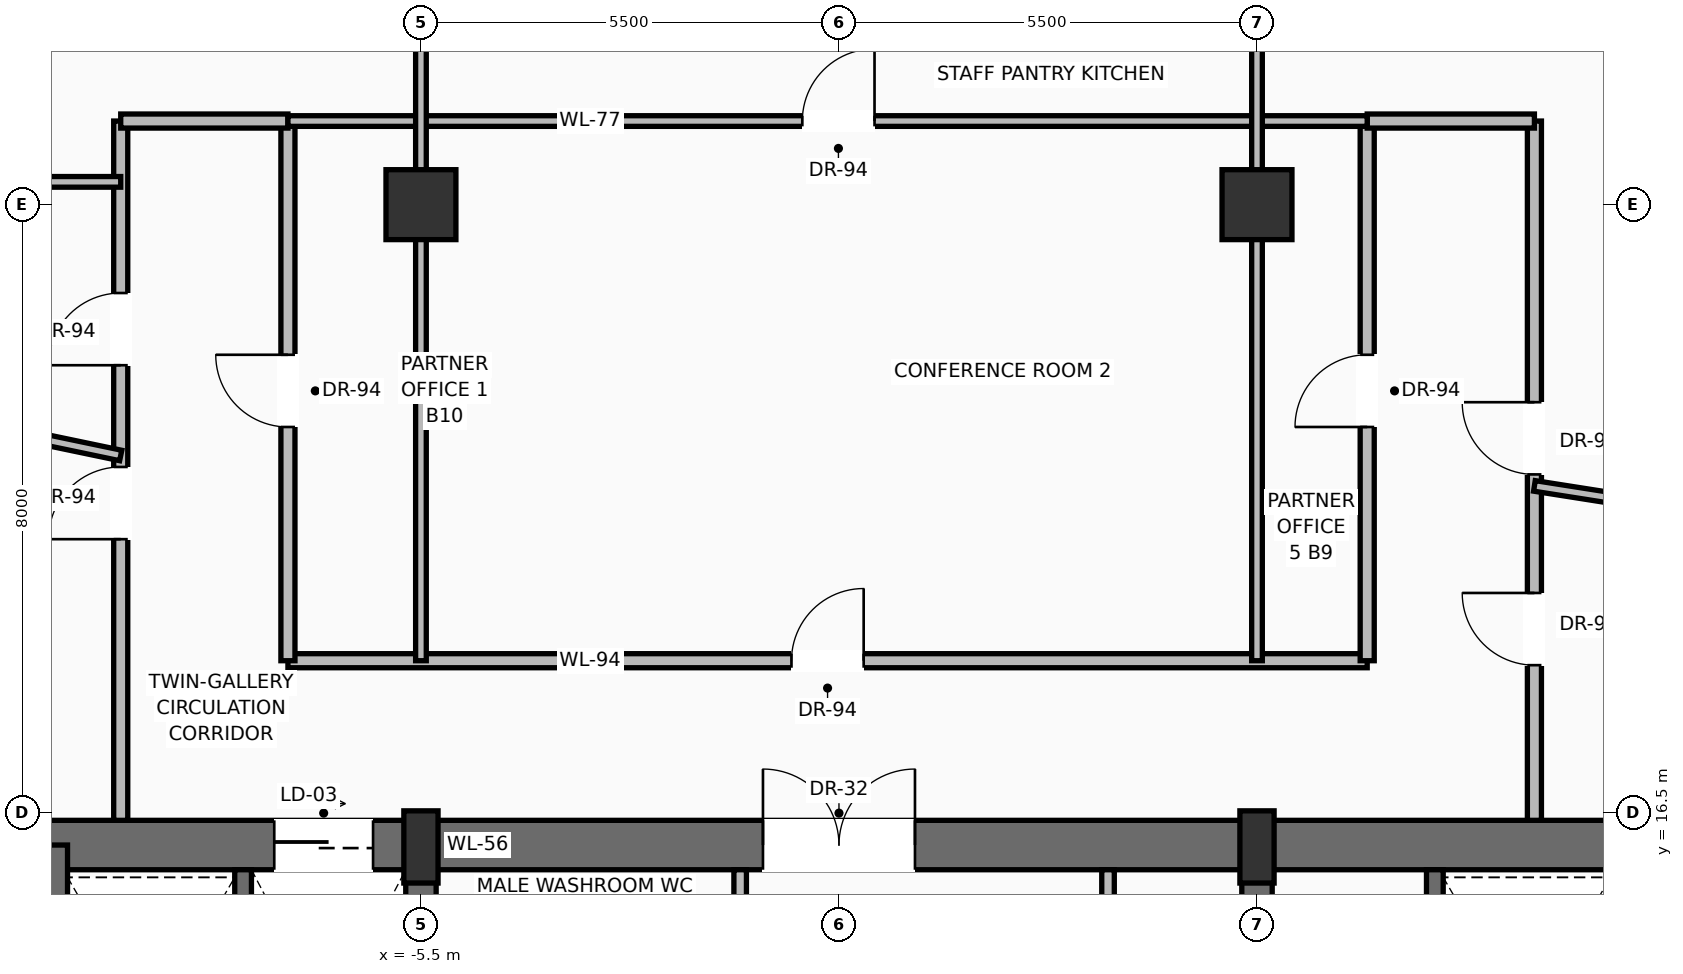
"""IFC4 building model, lengths in metres.
Left out: names, types, materials, properties, quantities, classifications, styles, units other than length and angle.
Written with IfcOpenShell. Run it as: python <this file> out.ifc"""

import sys

from ifc_helpers import new_model, si_unit, direction, frame, frame_2d, origin, origin_2d, place, context, subcontext, project, spatial, rectangle, extrude, source, transform, mapped, element, fill, save


model = new_model("IFC4")
c1 = context("Model", 3, precision=1e-05, world=origin(), true_north=direction((0.0, 1.0)))
c2 = subcontext(c1, "Body", "Model", "MODEL_VIEW")
j1 = project(units=[si_unit("LENGTHUNIT", "METRE"), si_unit("PLANEANGLEUNIT", "RADIAN")], contexts=[c1])
p1 = place(None, origin())
s1 = spatial("IfcSite", under=j1, at=p1, CompositionType="ELEMENT")
p2 = place(p1, origin())
s2 = spatial("IfcBuilding", under=s1, at=p2, CompositionType="ELEMENT")
p3 = place(p2, frame((0.0, 0.0, 174.7)))
s3 = spatial("IfcBuildingStorey", under=s2, at=p3, CompositionType="ELEMENT", Elevation=174.7)
p4 = place(p3, frame((-10.8, 16.075, 0.0), z_axis=(0.0, 0.0, 1.0), x_axis=(1.0, 0.0, 0.0)))
e1 = element("IfcWall", 1, at=p4, inside=s3, PredefinedType="SHEAR", context=c2, shape_type="SweptSolid", body=[
    extrude(rectangle(XDim=21.6, YDim=0.65, at=frame_2d((10.8, 0.0))), origin(), (0.0, 0.0, 1.0), 3.47),
])
p5 = place(p4, frame((3.37, 0.0, 0.0)))
e2 = element("IfcOpeningElement", 2, at=p5, cuts=e1, PredefinedType="OPENING", context=c2, shape_type="SweptSolid", body=[
    extrude(rectangle(XDim=1.3, YDim=2.3, at=frame_2d((0.65, 1.15))), frame((0.0, 0.335, 0.0), z_axis=(0.0, -1.0, 0.0), x_axis=(1.0, 0.0, 0.0)), (0.0, 0.0, 1.0), 0.67),
])
p6 = place(p4, frame((9.8, 0.0, 0.0)))
e3 = element("IfcOpeningElement", 3, at=p6, cuts=e1, PredefinedType="OPENING", context=c2, shape_type="SweptSolid", body=[
    extrude(rectangle(XDim=2.0, YDim=2.4, at=frame_2d((1.0, 1.2))), frame((0.0, 0.335, 0.0), z_axis=(0.0, -1.0, 0.0), x_axis=(1.0, 0.0, 0.0)), (0.0, 0.0, 1.0), 0.67),
])
p7 = place(p3, frame((-10.475, 0.525, 0.0), z_axis=(0.0, 0.0, 1.0), x_axis=(0.0, 1.0, 0.0)))
e4 = element("IfcWall", 4, at=p7, inside=s3, PredefinedType="SHEAR", context=c2, shape_type="SweptSolid", body=[
    extrude(rectangle(XDim=15.55, YDim=0.65, at=frame_2d((7.775, 0.0))), origin(), (0.0, 0.0, 1.0), 3.47),
])
p8 = place(p3, frame((-5.5, 0.525, 0.0), z_axis=(0.0, 0.0, 1.0), x_axis=(0.0, 1.0, 0.0)))
e5 = element("IfcWall", 5, at=p8, inside=s3, PredefinedType="SHEAR", context=c2, shape_type="SweptSolid", body=[
    extrude(rectangle(XDim=15.55, YDim=0.4, at=frame_2d((7.775, 0.0))), origin(), (0.0, 0.0, 1.0), 3.47),
])
p9 = place(p8, frame((8.975, 0.0, 0.0)))
e6 = element("IfcOpeningElement", 6, at=p9, cuts=e5, PredefinedType="OPENING", context=c2, shape_type="SweptSolid", body=[
    extrude(rectangle(XDim=1.1, YDim=2.2, at=frame_2d((0.55, 1.1))), frame((0.0, 0.21, 0.0), z_axis=(0.0, -1.0, 0.0), x_axis=(1.0, 0.0, 0.0)), (0.0, 0.0, 1.0), 0.42),
])
p10 = place(p3, frame((5.5, 0.525, 0.0), z_axis=(0.0, 0.0, 1.0), x_axis=(0.0, 1.0, 0.0)))
e7 = element("IfcWall", 7, at=p10, inside=s3, PredefinedType="SHEAR", context=c2, shape_type="SweptSolid", body=[
    extrude(rectangle(XDim=15.55, YDim=0.4, at=frame_2d((7.775, 0.0))), origin(), (0.0, 0.0, 1.0), 3.47),
])
p11 = place(p10, frame((8.975, 0.0, 0.0)))
e8 = element("IfcOpeningElement", 8, at=p11, cuts=e7, PredefinedType="OPENING", context=c2, shape_type="SweptSolid", body=[
    extrude(rectangle(XDim=1.1, YDim=2.2, at=frame_2d((0.55, 1.1))), frame((0.0, 0.21, 0.0), z_axis=(0.0, -1.0, 0.0), x_axis=(1.0, 0.0, 0.0)), (0.0, 0.0, 1.0), 0.42),
])
m1 = source(origin(), c2, "Body", "SweptSolid", [
    extrude(rectangle(XDim=0.45, YDim=0.95, at=origin_2d()), origin(), (0.0, 0.0, 1.0), 3.7),
])
for number, where, z_axis, x_axis in (
    (9, (-5.5, 16.05, 0.0), (0.0, 0.0, 1.0), (1.0, 0.0, 0.0)),
    (10, (5.5, 16.05, 0.0), (0.0, 0.0, 1.0), (1.0, 0.0, 0.0)),
):
    element("IfcColumn", number, at=place(p3, frame(where, z_axis=z_axis, x_axis=x_axis)), inside=s3, PredefinedType="PILASTER", context=c2, shape_type="MappedRepresentation", body=[
        mapped(m1, transform((0.0, 0.0, 0.0), scale=1.0)),
    ])
m2 = source(origin(), c2, "Body", "SweptSolid", [
    extrude(rectangle(XDim=0.92, YDim=0.92, at=origin_2d()), origin(), (0.0, 0.0, 1.0), 3.7),
])
for number, where, z_axis, x_axis in (
    (11, (-5.5, 24.5, 0.0), (0.0, 0.0, 1.0), (1.0, 0.0, 0.0)),
    (12, (5.5, 24.5, 0.0), (0.0, 0.0, 1.0), (1.0, 0.0, 0.0)),
):
    element("IfcColumn", number, at=place(p3, frame(where, z_axis=z_axis, x_axis=x_axis)), inside=s3, PredefinedType="COLUMN", context=c2, shape_type="MappedRepresentation", body=[
        mapped(m2, transform((0.0, 0.0, 0.0), scale=1.0)),
    ])
for number, where, z_axis, x_axis in (
    (13, (-7.84, 11.87, 0.0), (0.0, 0.0, 1.0), (0.0, 1.0, 0.0)),
    (14, (7.84, 11.87, 0.0), (0.0, 0.0, 1.0), (0.0, 1.0, 0.0)),
):
    element("IfcWall", number, at=place(p3, frame(where, z_axis=z_axis, x_axis=x_axis)), inside=s3, PredefinedType="SOLIDWALL", context=c2, shape_type="SweptSolid", body=[
        extrude(rectangle(XDim=3.88, YDim=0.22, at=frame_2d((1.94, 0.0))), origin(), (0.0, 0.0, 1.0), 3.47),
    ])
p12 = place(p3, frame((-1.3, 13.6, 0.0), z_axis=(0.0, 0.0, 1.0), x_axis=(0.0, 1.0, 0.0)))
e15 = element("IfcWall", 15, at=p12, inside=s3, PredefinedType="PARTITIONING", context=c2, shape_type="SweptSolid", body=[
    extrude(rectangle(XDim=2.15, YDim=0.165, at=frame_2d((1.075, 0.0))), origin(), (0.0, 0.0, 1.0), 3.462),
])
p13 = place(p12, frame((0.55, 0.0, 0.0)))
e16 = element("IfcOpeningElement", 16, at=p13, cuts=e15, PredefinedType="OPENING", context=c2, shape_type="SweptSolid", body=[
    extrude(rectangle(XDim=0.9, YDim=2.1, at=frame_2d((0.45, 1.05))), frame((0.0, 0.093, 0.0), z_axis=(0.0, -1.0, 0.0), x_axis=(1.0, 0.0, 0.0)), (0.0, 0.0, 1.0), 0.185),
])
p14 = place(p3, frame((3.54, 11.22, 0.0), z_axis=(0.0, 0.0, 1.0), x_axis=(0.0, 1.0, 0.0)))
e17 = element("IfcWall", 17, at=p14, inside=s3, PredefinedType="PARTITIONING", context=c2, shape_type="SweptSolid", body=[
    extrude(rectangle(XDim=4.53, YDim=0.165, at=frame_2d((2.265, 0.0))), origin(), (0.0, 0.0, 1.0), 3.462),
])
p15 = place(p14, frame((1.25, 0.0, 0.0)))
e18 = element("IfcOpeningElement", 18, at=p15, cuts=e17, PredefinedType="OPENING", context=c2, shape_type="SweptSolid", body=[
    extrude(rectangle(XDim=0.9, YDim=2.1, at=frame_2d((0.45, 1.05))), frame((0.0, 0.093, 0.0), z_axis=(0.0, -1.0, 0.0), x_axis=(1.0, 0.0, 0.0)), (0.0, 0.0, 1.0), 0.185),
])
p16 = place(p3, frame((-7.25, 18.5, 0.0), z_axis=(0.0, 0.0, 1.0), x_axis=(1.0, 0.0, 0.0)))
e19 = element("IfcWall", 19, at=p16, inside=s3, PredefinedType="PARTITIONING", context=c2, shape_type="SweptSolid", body=[
    extrude(rectangle(XDim=14.2, YDim=0.185, at=frame_2d((7.1, 0.0))), origin(), (0.0, 0.0, 1.0), 2.846),
])
p17 = place(p16, frame((6.625, 0.0, 0.0)))
e20 = element("IfcOpeningElement", 20, at=p17, cuts=e19, PredefinedType="OPENING", context=c2, shape_type="SweptSolid", body=[
    extrude(rectangle(XDim=0.95, YDim=2.2, at=frame_2d((0.475, 1.1))), frame((0.0, 0.103, 0.0), z_axis=(0.0, -1.0, 0.0), x_axis=(1.0, 0.0, 0.0)), (0.0, 0.0, 1.0), 0.205),
])
p18 = place(p3, frame((-7.25, 18.5, 0.0), z_axis=(0.0, 0.0, 1.0), x_axis=(0.0, 1.0, 0.0)))
e21 = element("IfcWall", 21, at=p18, inside=s3, PredefinedType="PARTITIONING", context=c2, shape_type="SweptSolid", body=[
    extrude(rectangle(XDim=7.1, YDim=0.185, at=frame_2d((3.55, 0.0))), origin(), (0.0, 0.0, 1.0), 2.846),
])
p19 = place(p18, frame((3.075, 0.0, 0.0)))
e22 = element("IfcOpeningElement", 22, at=p19, cuts=e21, PredefinedType="OPENING", context=c2, shape_type="SweptSolid", body=[
    extrude(rectangle(XDim=0.95, YDim=2.2, at=frame_2d((0.475, 1.1))), frame((0.0, 0.103, 0.0), z_axis=(0.0, -1.0, 0.0), x_axis=(1.0, 0.0, 0.0)), (0.0, 0.0, 1.0), 0.205),
])
p20 = place(p3, frame((6.95, 18.5, 0.0), z_axis=(0.0, 0.0, 1.0), x_axis=(0.0, 1.0, 0.0)))
e23 = element("IfcWall", 23, at=p20, inside=s3, PredefinedType="PARTITIONING", context=c2, shape_type="SweptSolid", body=[
    extrude(rectangle(XDim=7.1, YDim=0.185, at=frame_2d((3.55, 0.0))), origin(), (0.0, 0.0, 1.0), 2.846),
])
p21 = place(p20, frame((3.075, 0.0, 0.0)))
e24 = element("IfcOpeningElement", 24, at=p21, cuts=e23, PredefinedType="OPENING", context=c2, shape_type="SweptSolid", body=[
    extrude(rectangle(XDim=0.95, YDim=2.2, at=frame_2d((0.475, 1.1))), frame((0.0, 0.103, 0.0), z_axis=(0.0, -1.0, 0.0), x_axis=(1.0, 0.0, 0.0)), (0.0, 0.0, 1.0), 0.205),
])
p22 = place(p3, frame((-9.45, 16.4, 0.0), z_axis=(0.0, 0.0, 1.0), x_axis=(0.0, 1.0, 0.0)))
e25 = element("IfcWall", 25, at=p22, inside=s3, PredefinedType="PARTITIONING", context=c2, shape_type="SweptSolid", body=[
    extrude(rectangle(XDim=9.2, YDim=0.185, at=frame_2d((4.6, 0.0))), origin(), (0.0, 0.0, 1.0), 2.846),
])
p23 = place(p22, frame((3.699, 0.0, 0.0)))
e26 = element("IfcOpeningElement", 26, at=p23, cuts=e25, PredefinedType="OPENING", context=c2, shape_type="SweptSolid", body=[
    extrude(rectangle(XDim=0.95, YDim=2.2, at=frame_2d((0.475, 1.1))), frame((0.0, 0.103, 0.0), z_axis=(0.0, -1.0, 0.0), x_axis=(1.0, 0.0, 0.0)), (0.0, 0.0, 1.0), 0.205),
])
p24 = place(p22, frame((5.988, 0.0, 0.0)))
e27 = element("IfcOpeningElement", 27, at=p24, cuts=e25, PredefinedType="OPENING", context=c2, shape_type="SweptSolid", body=[
    extrude(rectangle(XDim=0.95, YDim=2.2, at=frame_2d((0.475, 1.1))), frame((0.0, 0.103, 0.0), z_axis=(0.0, -1.0, 0.0), x_axis=(1.0, 0.0, 0.0)), (0.0, 0.0, 1.0), 0.205),
])
p25 = place(p3, frame((9.15, 16.4, 0.0), z_axis=(0.0, 0.0, 1.0), x_axis=(0.0, 1.0, 0.0)))
e28 = element("IfcWall", 28, at=p25, inside=s3, PredefinedType="PARTITIONING", context=c2, shape_type="SweptSolid", body=[
    extrude(rectangle(XDim=9.2, YDim=0.185, at=frame_2d((4.6, 0.0))), origin(), (0.0, 0.0, 1.0), 2.846),
])
p26 = place(p25, frame((4.551, 0.0, 0.0)))
e29 = element("IfcOpeningElement", 29, at=p26, cuts=e28, PredefinedType="OPENING", context=c2, shape_type="SweptSolid", body=[
    extrude(rectangle(XDim=0.95, YDim=2.2, at=frame_2d((0.475, 1.1))), frame((0.0, 0.103, 0.0), z_axis=(0.0, -1.0, 0.0), x_axis=(1.0, 0.0, 0.0)), (0.0, 0.0, 1.0), 0.205),
])
p27 = place(p25, frame((2.042, 0.0, 0.0)))
e30 = element("IfcOpeningElement", 30, at=p27, cuts=e28, PredefinedType="OPENING", context=c2, shape_type="SweptSolid", body=[
    extrude(rectangle(XDim=0.95, YDim=2.2, at=frame_2d((0.475, 1.1))), frame((0.0, 0.103, 0.0), z_axis=(0.0, -1.0, 0.0), x_axis=(1.0, 0.0, 0.0)), (0.0, 0.0, 1.0), 0.205),
])
for number, where, z_axis, x_axis in (
    (31, (-9.45, 25.6, 0.0), (0.0, 0.0, 1.0), (1.0, 0.0, 0.0)),
    (32, (6.95, 25.6, 0.0), (0.0, 0.0, 1.0), (1.0, 0.0, 0.0)),
):
    element("IfcWall", number, at=place(p3, frame(where, z_axis=z_axis, x_axis=x_axis)), inside=s3, PredefinedType="PARTITIONING", context=c2, shape_type="SweptSolid", body=[
        extrude(rectangle(XDim=2.2, YDim=0.185, at=frame_2d((1.1, 0.0))), origin(), (0.0, 0.0, 1.0), 3.462),
    ])
p28 = place(p3, frame((-7.25, 25.6, 0.0), z_axis=(0.0, 0.0, 1.0), x_axis=(1.0, 0.0, 0.0)))
e33 = element("IfcWall", 33, at=p28, inside=s3, PredefinedType="PARTITIONING", context=c2, shape_type="SweptSolid", body=[
    extrude(rectangle(XDim=14.2, YDim=0.14, at=frame_2d((7.1, 0.0))), origin(), (0.0, 0.0, 1.0), 3.462),
])
p29 = place(p28, frame((6.768, 0.0, 0.0)))
e34 = element("IfcOpeningElement", 34, at=p29, cuts=e33, PredefinedType="OPENING", context=c2, shape_type="SweptSolid", body=[
    extrude(rectangle(XDim=0.95, YDim=2.2, at=frame_2d((0.475, 1.1))), frame((0.0, 0.08, 0.0), z_axis=(0.0, -1.0, 0.0), x_axis=(1.0, 0.0, 0.0)), (0.0, 0.0, 1.0), 0.16),
])
for number, where, z_axis, x_axis in (
    (35, (-5.5, 18.5, 0.0), (0.0, 0.0, 1.0), (0.0, 1.0, 0.0)),
    (36, (5.5, 18.5, 0.0), (0.0, 0.0, 1.0), (0.0, 1.0, 0.0)),
):
    element("IfcWall", number, at=place(p3, frame(where, z_axis=z_axis, x_axis=x_axis)), inside=s3, PredefinedType="PARTITIONING", context=c2, shape_type="SweptSolid", body=[
        extrude(rectangle(XDim=14.0, YDim=0.14, at=frame_2d((7.0, 0.0))), origin(), (0.0, 0.0, 1.0), 2.846),
    ])
p30 = place(p3, frame((-16.77, 22.728, 0.0), z_axis=(0.0, 0.0, 1.0), x_axis=(0.978892052861, -0.204377955872, 0.0)))
e37 = element("IfcWall", 37, at=p30, inside=s3, PredefinedType="PARTITIONING", context=c2, shape_type="SweptSolid", body=[
    extrude(rectangle(XDim=7.478, YDim=0.14, at=frame_2d((3.739, 0.0))), origin(), (0.0, 0.0, 1.0), 3.049),
])
p31 = place(p3, frame((-15.469, 24.8, 0.0), z_axis=(0.0, 0.0, 1.0), x_axis=(1.0, 0.0, 0.0)))
e38 = element("IfcWall", 38, at=p31, inside=s3, PredefinedType="PARTITIONING", context=c2, shape_type="SweptSolid", body=[
    extrude(rectangle(XDim=6.019, YDim=0.14, at=frame_2d((3.009, 0.0))), origin(), (0.0, 0.0, 1.0), 3.462),
])
p32 = place(p3, frame((9.15, 20.8, 0.0), z_axis=(0.0, 0.0, 1.0), x_axis=(0.987888554184, -0.155165087929, 0.0)))
e39 = element("IfcWall", 39, at=p32, inside=s3, PredefinedType="PARTITIONING", context=c2, shape_type="SweptSolid", body=[
    extrude(rectangle(XDim=9.779, YDim=0.14, at=frame_2d((4.889, 0.0))), origin(), (0.0, 0.0, 1.0), 3.049),
])
m3 = source(origin(), c2, "Body", "SweptSolid", [
    extrude(rectangle(XDim=1.3, YDim=2.3, at=frame_2d((0.65, 1.15))), frame((0.0, 0.025, 0.0), z_axis=(0.0, -1.0, 0.0), x_axis=(1.0, 0.0, 0.0)), (0.0, 0.0, 1.0), 0.05),
])
p33 = place(p5, origin())
e40 = element("IfcDoor", 40, at=p33, inside=s3, OperationType="SLIDING_TO_RIGHT", PredefinedType="DOOR", context=c2, shape_type="MappedRepresentation", body=[
    mapped(m3, transform((0.0, 0.0, 0.0), scale=1.0)),
])
fill(e2, e40)
m4 = source(origin(), c2, "Body", "SweptSolid", [
    extrude(rectangle(XDim=2.0, YDim=2.4, at=frame_2d((1.0, 1.2))), frame((0.0, 0.025, 0.0), z_axis=(0.0, -1.0, 0.0), x_axis=(1.0, 0.0, 0.0)), (0.0, 0.0, 1.0), 0.05),
])
p34 = place(p6, origin())
e41 = element("IfcDoor", 41, at=p34, inside=s3, OperationType="DOUBLE_DOOR_SINGLE_SWING", PredefinedType="DOOR", context=c2, shape_type="MappedRepresentation", body=[
    mapped(m4, transform((0.0, 0.0, 0.0), scale=1.0)),
])
fill(e3, e41)
m5 = source(origin(), c2, "Body", "SweptSolid", [
    extrude(rectangle(XDim=0.95, YDim=2.2, at=frame_2d((0.475, 1.1))), frame((0.0, 0.025, 0.0), z_axis=(0.0, -1.0, 0.0), x_axis=(1.0, 0.0, 0.0)), (0.0, 0.0, 1.0), 0.05),
])
p35 = place(p17, origin())
e42 = element("IfcDoor", 42, at=p35, inside=s3, OperationType="SINGLE_SWING_RIGHT", PredefinedType="DOOR", context=c2, shape_type="MappedRepresentation", body=[
    mapped(m5, transform((0.0, 0.0, 0.0), scale=1.0)),
])
fill(e20, e42)
p36 = place(p23, origin())
e43 = element("IfcDoor", 43, at=p36, inside=s3, OperationType="SINGLE_SWING_LEFT", PredefinedType="DOOR", context=c2, shape_type="MappedRepresentation", body=[
    mapped(m5, transform((0.0, 0.0, 0.0), scale=1.0)),
])
fill(e26, e43)
p37 = place(p26, origin())
e44 = element("IfcDoor", 44, at=p37, inside=s3, OperationType="SINGLE_SWING_RIGHT", PredefinedType="DOOR", context=c2, shape_type="MappedRepresentation", body=[
    mapped(m5, transform((0.0, 0.0, 0.0), scale=1.0)),
])
fill(e29, e44)
p38 = place(p27, origin())
e45 = element("IfcDoor", 45, at=p38, inside=s3, OperationType="SINGLE_SWING_RIGHT", PredefinedType="DOOR", context=c2, shape_type="MappedRepresentation", body=[
    mapped(m5, transform((0.0, 0.0, 0.0), scale=1.0)),
])
fill(e30, e45)
p39 = place(p21, origin())
e46 = element("IfcDoor", 46, at=p39, inside=s3, OperationType="SINGLE_SWING_LEFT", PredefinedType="DOOR", context=c2, shape_type="MappedRepresentation", body=[
    mapped(m5, transform((0.0, 0.0, 0.0), scale=1.0)),
])
fill(e24, e46)
p40 = place(p19, origin())
e47 = element("IfcDoor", 47, at=p40, inside=s3, OperationType="SINGLE_SWING_RIGHT", PredefinedType="DOOR", context=c2, shape_type="MappedRepresentation", body=[
    mapped(m5, transform((0.0, 0.0, 0.0), scale=1.0)),
])
fill(e22, e47)
p41 = place(p24, origin())
e48 = element("IfcDoor", 48, at=p41, inside=s3, OperationType="SINGLE_SWING_LEFT", PredefinedType="DOOR", context=c2, shape_type="MappedRepresentation", body=[
    mapped(m5, transform((0.0, 0.0, 0.0), scale=1.0)),
])
fill(e27, e48)
p42 = place(p29, origin())
e49 = element("IfcDoor", 49, at=p42, inside=s3, OperationType="SINGLE_SWING_RIGHT", PredefinedType="DOOR", context=c2, shape_type="MappedRepresentation", body=[
    mapped(m5, transform((0.0, 0.0, 0.0), scale=1.0)),
])
fill(e34, e49)
save(model, sys.argv[1])
